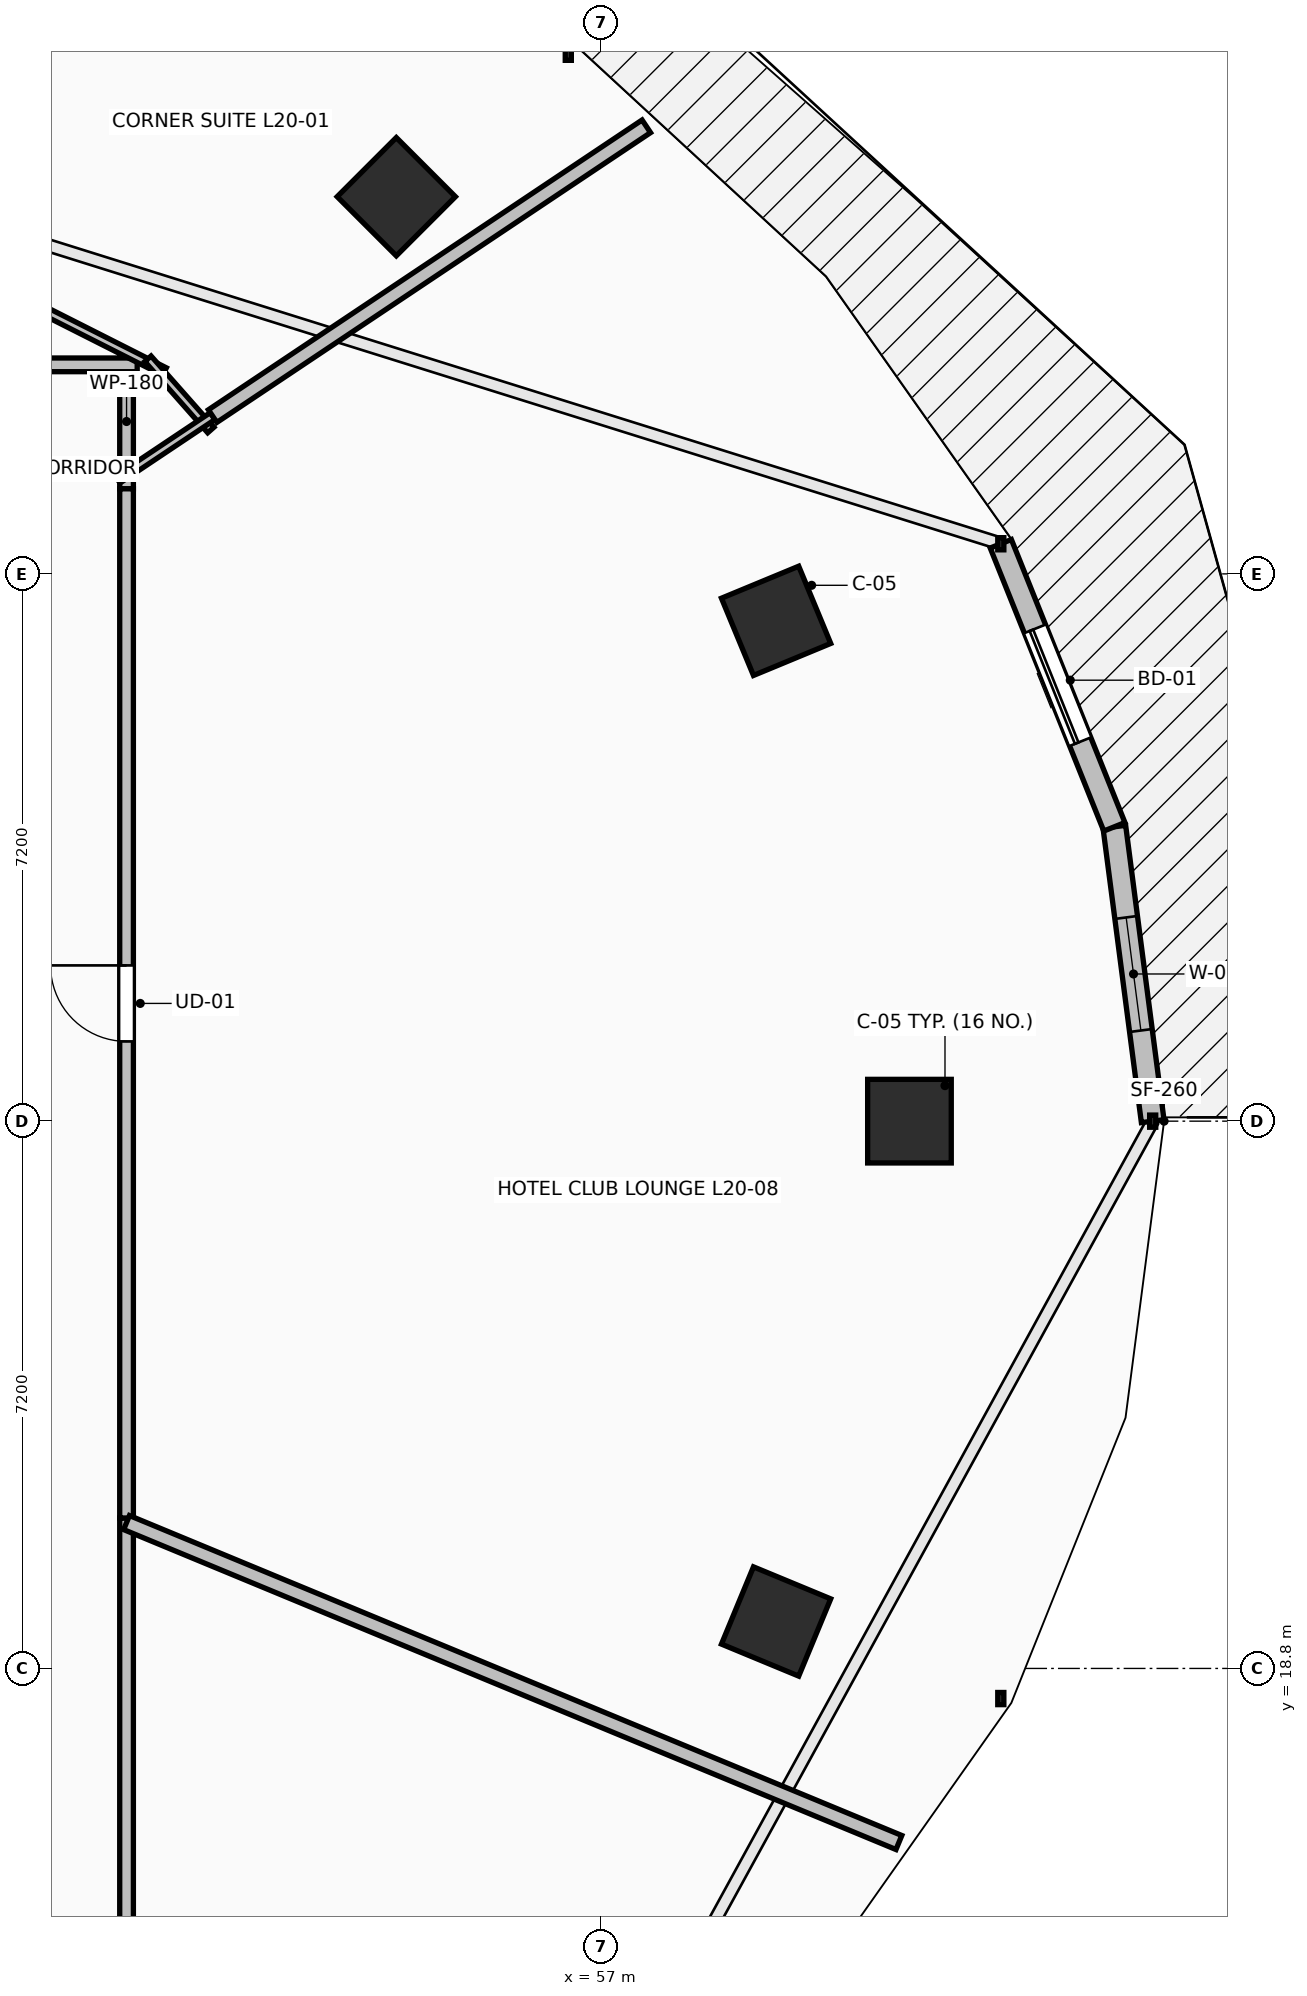
"""IFC4 building model, lengths in metres.
Left out: names, types, materials, properties, quantities, classifications, styles, units other than length and angle.
Written with IfcOpenShell. Run it as: python <this file> out.ifc"""

import sys

from ifc_helpers import new_model, si_unit, direction, frame, frame_2d, origin, origin_2d, place, context, subcontext, project, spatial, rectangle, extrude, element, fill, save


model = new_model("IFC4")
c1 = context("Model", 3, precision=1e-05, world=origin(), true_north=direction((0.0, 1.0)))
c2 = subcontext(c1, "Body", "Model", "MODEL_VIEW")
j1 = project(units=[si_unit("LENGTHUNIT", "METRE"), si_unit("PLANEANGLEUNIT", "RADIAN")], contexts=[c1])
p1 = place(None, origin())
s1 = spatial("IfcSite", under=j1, at=p1, CompositionType="ELEMENT")
p2 = place(p1, origin())
s2 = spatial("IfcBuilding", under=s1, at=p2, CompositionType="ELEMENT")
p3 = place(p2, frame((0.0, 0.0, 78.8)))
s3 = spatial("IfcBuildingStorey", under=s2, at=p3, CompositionType="ELEMENT", Elevation=78.8)
for number, where, z_axis, x_axis in (
    (1, (61.05, 26.0, 0.0), (0.0, 0.0, 1.0), (1.0, 0.0, 0.0)),
    (2, (59.295, 32.582, 0.0), (0.0, 0.0, 1.0), (0.924, 0.383, 0.0)),
    (3, (54.299, 38.162, 0.0), (0.0, 0.0, 1.0), (0.707, 0.707, 0.0)),
    (4, (59.295, 19.418, 0.0), (0.0, 0.0, 1.0), (0.924, -0.383, 0.0)),
):
    element("IfcColumn", number, at=place(p3, frame(where, z_axis=z_axis, x_axis=x_axis)), inside=s3, PredefinedType="COLUMN", context=c2, shape_type="SweptSolid", body=[
        extrude(rectangle(XDim=1.1, YDim=1.1, at=origin_2d()), origin(), (0.0, 0.0, 1.0), 3.5),
    ])
p4 = place(p3, frame((64.25, 26.0, 0.0), z_axis=(0.0, 0.0, 1.0), x_axis=(-0.129157444793, 0.991624099372, 0.0)))
e5 = element("IfcWall", 5, at=p4, inside=s3, PredefinedType="STANDARD", context=c2, shape_type="SweptSolid", body=[
    extrude(rectangle(XDim=3.905, YDim=0.3, at=frame_2d((1.953, 0.0))), origin(), (0.0, 0.0, 1.0), 3.24),
])
p5 = place(p4, frame((1.203, 0.0, 0.85)))
e6 = element("IfcOpeningElement", 6, at=p5, cuts=e5, PredefinedType="OPENING", context=c2, shape_type="SweptSolid", body=[
    extrude(rectangle(XDim=1.5, YDim=2.19, at=frame_2d((0.75, 1.095))), frame((0.0, 0.165, 0.0), z_axis=(0.0, -1.0, 0.0), x_axis=(1.0, 0.0, 0.0)), (0.0, 0.0, 1.0), 0.33),
])
p6 = place(p3, frame((63.746, 29.873, 0.0), z_axis=(0.0, 0.0, 1.0), x_axis=(-0.372345205928, 0.92809430966, 0.0)))
e7 = element("IfcWall", 7, at=p6, inside=s3, PredefinedType="STANDARD", context=c2, shape_type="SweptSolid", body=[
    extrude(rectangle(XDim=4.012, YDim=0.3, at=frame_2d((2.006, 0.0))), origin(), (0.0, 0.0, 1.0), 3.24),
])
p7 = place(p6, frame((1.206, 0.0, 0.0)))
e8 = element("IfcOpeningElement", 8, at=p7, cuts=e7, PredefinedType="OPENING", context=c2, shape_type="SweptSolid", body=[
    extrude(rectangle(XDim=1.6, YDim=2.3, at=frame_2d((0.8, 1.15))), frame((0.0, 0.165, 0.0), z_axis=(0.0, -1.0, 0.0), x_axis=(1.0, 0.0, 0.0)), (0.0, 0.0, 1.0), 0.33),
])
p8 = place(p3, frame((50.75, 34.319, 0.0), z_axis=(0.0, 0.0, 1.0), x_axis=(0.0, 1.0, 0.0)))
e9 = element("IfcWall", 9, at=p8, inside=s3, PredefinedType="PARTITIONING", context=c2, shape_type="SweptSolid", body=[
    extrude(rectangle(XDim=1.771, YDim=0.18, at=frame_2d((0.885, 0.0))), origin(), (0.0, 0.0, 1.0), 2.432),
])
p9 = place(p3, frame((50.89, 35.95, 0.0), z_axis=(0.0, 0.0, 1.0), x_axis=(-1.0, 0.0, 0.0)))
e10 = element("IfcWall", 10, at=p9, inside=s3, PredefinedType="PARTITIONING", context=c2, shape_type="SweptSolid", body=[
    extrude(rectangle(XDim=5.606, YDim=0.18, at=frame_2d((2.803, 0.0))), origin(), (0.0, 0.0, 1.0), 2.432),
])
p10 = place(p3, frame((50.75, 14.1, 0.0), z_axis=(0.0, 0.0, 1.0), x_axis=(0.0, 1.0, 0.0)))
e11 = element("IfcWall", 11, at=p10, inside=s3, PredefinedType="PARTITIONING", context=c2, shape_type="SweptSolid", body=[
    extrude(rectangle(XDim=6.679, YDim=0.18, at=frame_2d((3.339, 0.0))), origin(), (0.0, 0.0, 1.0), 2.432),
])
p11 = place(p3, frame((50.75, 20.779, 0.0), z_axis=(0.0, 0.0, 1.0), x_axis=(0.0, 1.0, 0.0)))
e12 = element("IfcWall", 12, at=p11, inside=s3, PredefinedType="PARTITIONING", context=c2, shape_type="SweptSolid", body=[
    extrude(rectangle(XDim=13.54, YDim=0.18, at=frame_2d((6.77, 0.0))), origin(), (0.0, 0.0, 1.0), 2.432),
])
p12 = place(p11, frame((6.27, 0.0, 0.0)))
e13 = element("IfcOpeningElement", 13, at=p12, cuts=e12, PredefinedType="OPENING", context=c2, shape_type="SweptSolid", body=[
    extrude(rectangle(XDim=1.0, YDim=2.15, at=frame_2d((0.5, 1.075))), frame((0.0, 0.105, 0.0), z_axis=(0.0, -1.0, 0.0), x_axis=(1.0, 0.0, 0.0)), (0.0, 0.0, 1.0), 0.21),
])
p13 = place(p3, frame((46.78, 38.12, 0.0), z_axis=(0.0, 0.0, 1.0), x_axis=(0.892517538434, -0.451012686726, 0.0)))
e14 = element("IfcWall", 14, at=p13, inside=s3, PredefinedType="PARTITIONING", context=c2, shape_type="SweptSolid", body=[
    extrude(rectangle(XDim=5.007, YDim=0.11, at=frame_2d((2.503, 0.0))), origin(), (0.0, 0.0, 1.0), 2.432),
])
p14 = place(p13, frame((2.079, 0.0, 0.0)))
e15 = element("IfcOpeningElement", 15, at=p14, cuts=e14, PredefinedType="OPENING", context=c2, shape_type="SweptSolid", body=[
    extrude(rectangle(XDim=0.85, YDim=2.1, at=frame_2d((0.425, 1.05))), frame((0.0, 0.07, 0.0), z_axis=(0.0, -1.0, 0.0), x_axis=(1.0, 0.0, 0.0)), (0.0, 0.0, 1.0), 0.14),
])
p15 = place(p3, frame((51.031, 36.03, 0.0), z_axis=(0.0, 0.0, 1.0), x_axis=(0.661996266618, -0.749507133377, 0.0)))
e16 = element("IfcWall", 16, at=p15, inside=s3, PredefinedType="PARTITIONING", context=c2, shape_type="SweptSolid", body=[
    extrude(rectangle(XDim=1.25, YDim=0.11, at=frame_2d((0.625, 0.0))), origin(), (0.0, 0.0, 1.0), 2.432),
])
p16 = place(p3, frame((51.882, 35.276, 0.0), z_axis=(0.0, 0.0, 1.0), x_axis=(-0.831374526136, -0.555712513169, 0.0)))
e17 = element("IfcWall", 17, at=p16, inside=s3, PredefinedType="PARTITIONING", context=c2, shape_type="SweptSolid", body=[
    extrude(rectangle(XDim=1.502, YDim=0.11, at=frame_2d((0.751, 0.0))), origin(), (0.0, 0.0, 1.0), 2.922),
])
p17 = place(p3, frame((51.883, 35.276, 0.0), z_axis=(0.0, 0.0, 1.0), x_axis=(0.831464132421, 0.555578434154, 0.0)))
e18 = element("IfcWall", 18, at=p17, inside=s3, PredefinedType="PARTITIONING", context=c2, shape_type="SweptSolid", body=[
    extrude(rectangle(XDim=6.862, YDim=0.2, at=frame_2d((3.431, 0.0))), origin(), (0.0, 0.0, 1.0), 2.677),
])
p18 = place(p3, frame((60.911, 16.51, 0.0), z_axis=(0.0, 0.0, 1.0), x_axis=(-0.923872894692, 0.382699457086, 0.0)))
e19 = element("IfcWall", 19, at=p18, inside=s3, PredefinedType="PARTITIONING", context=c2, shape_type="SweptSolid", body=[
    extrude(rectangle(XDim=10.998, YDim=0.2, at=frame_2d((5.499, 0.0))), origin(), (0.0, 0.0, 1.0), 2.677),
])
p19 = place(p7, origin())
e20 = element("IfcDoor", 20, at=p19, inside=s3, OperationType="SLIDING_TO_LEFT", PredefinedType="DOOR", context=c2, shape_type="SweptSolid", body=[
    extrude(rectangle(XDim=1.6, YDim=2.3, at=frame_2d((0.8, 1.15))), frame((0.0, 0.025, 0.0), z_axis=(0.0, -1.0, 0.0), x_axis=(1.0, 0.0, 0.0)), (0.0, 0.0, 1.0), 0.05),
])
fill(e8, e20)
p20 = place(p5, origin())
e21 = element("IfcWindow", 21, at=p20, inside=s3, PartitioningType="SINGLE_PANEL", PredefinedType="WINDOW", context=c2, shape_type="SweptSolid", body=[
    extrude(rectangle(XDim=1.5, YDim=2.19, at=frame_2d((0.75, 1.095))), frame((0.0, 0.03, 0.0), z_axis=(0.0, -1.0, 0.0), x_axis=(1.0, 0.0, 0.0)), (0.0, 0.0, 1.0), 0.06),
])
fill(e6, e21)
p21 = place(p12, origin())
e22 = element("IfcDoor", 22, at=p21, inside=s3, OperationType="SINGLE_SWING_RIGHT", PredefinedType="DOOR", context=c2, shape_type="SweptSolid", body=[
    extrude(rectangle(XDim=1.0, YDim=2.15, at=frame_2d((0.5, 1.075))), frame((0.0, 0.025, 0.0), z_axis=(0.0, -1.0, 0.0), x_axis=(1.0, 0.0, 0.0)), (0.0, 0.0, 1.0), 0.05),
])
fill(e13, e22)
save(model, sys.argv[1])
